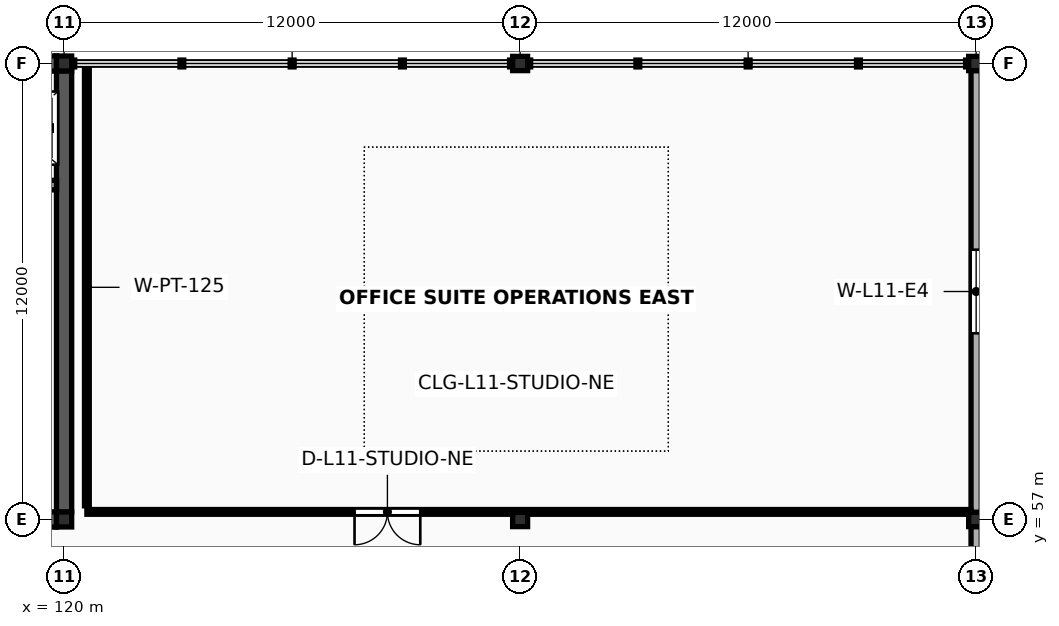
"""IFC4 building model, lengths in metres.
Left out: names, types, materials, properties, quantities, classifications, styles, units other than length and angle.
Written with IfcOpenShell. Run it as: python <this file> out.ifc"""

import sys

from ifc_helpers import new_model, si_unit, direction, frame, frame_2d, origin, origin_2d, place, context, subcontext, project, spatial, rectangle, i_section, extrude, element, fill, save


model = new_model("IFC4")
c1 = context("Model", 3, precision=1e-05, world=origin(), true_north=direction((0.0, 1.0)))
c2 = subcontext(c1, "Body", "Model", "MODEL_VIEW")
j1 = project(units=[si_unit("LENGTHUNIT", "METRE"), si_unit("PLANEANGLEUNIT", "RADIAN")], contexts=[c1])
p1 = place(None, origin())
s1 = spatial("IfcSite", under=j1, at=p1, CompositionType="ELEMENT")
p2 = place(p1, origin())
s2 = spatial("IfcBuilding", under=s1, at=p2, CompositionType="ELEMENT")
p3 = place(p2, frame((0.0, 0.0, 45.6)))
s3 = spatial("IfcBuildingStorey", under=s2, at=p3, CompositionType="ELEMENT", Elevation=45.6)
for number, where, z_axis, x_axis in (
    (1, (120.0, 57.0, 0.0), (0.0, 0.0, 1.0), (1.0, 0.0, 0.0)),
    (2, (120.0, 69.0, 0.0), (0.0, 0.0, 1.0), (1.0, 0.0, 0.0)),
):
    element("IfcColumn", number, at=place(p3, frame(where, z_axis=z_axis, x_axis=x_axis)), inside=s3, PredefinedType="COLUMN", context=c2, shape_type="SweptSolid", body=[
        extrude(i_section(OverallWidth=0.399, OverallDepth=0.393, WebThickness=0.023, FlangeThickness=0.037, FilletRadius=0.018, at=origin_2d()), origin(), (0.0, 0.0, 1.0), 4.0),
    ])
for number, where, z_axis, x_axis in (
    (3, (132.0, 57.0, 0.0), (0.0, 0.0, 1.0), (1.0, 0.0, 0.0)),
    (4, (132.0, 69.0, 0.0), (0.0, 0.0, 1.0), (1.0, 0.0, 0.0)),
    (5, (144.0, 57.0, 0.0), (0.0, 0.0, 1.0), (1.0, 0.0, 0.0)),
    (6, (144.0, 69.0, 0.0), (0.0, 0.0, 1.0), (1.0, 0.0, 0.0)),
):
    element("IfcColumn", number, at=place(p3, frame(where, z_axis=z_axis, x_axis=x_axis)), inside=s3, PredefinedType="COLUMN", context=c2, shape_type="SweptSolid", body=[
        extrude(i_section(OverallWidth=0.394, OverallDepth=0.375, WebThickness=0.017, FlangeThickness=0.028, FilletRadius=0.018, at=origin_2d()), origin(), (0.0, 0.0, 1.0), 4.0),
    ])
p4 = place(p3, frame((108.197, 57.0, 0.0), z_axis=(0.0, 0.0, 1.0), x_axis=(1.0, 0.0, 0.0)))
e7 = element("IfcWall", 7, at=p4, inside=s3, PredefinedType="SHEAR", context=c2, shape_type="SweptSolid", body=[
    extrude(rectangle(XDim=11.607, YDim=0.4, at=frame_2d((5.803, 0.0))), origin(), (0.0, 0.0, 1.0), 3.843),
])
p5 = place(p4, frame((5.004, 0.0, 0.0)))
e8 = element("IfcOpeningElement", 8, at=p5, cuts=e7, PredefinedType="OPENING", context=c2, shape_type="SweptSolid", body=[
    extrude(rectangle(XDim=1.2, YDim=2.2, at=frame_2d((0.6, 1.1))), frame((0.0, 0.215, 0.0), z_axis=(0.0, -1.0, 0.0), x_axis=(1.0, 0.0, 0.0)), (0.0, 0.0, 1.0), 0.43),
])
p6 = place(p4, frame((8.704, 0.0, 0.0)))
e9 = element("IfcOpeningElement", 9, at=p6, cuts=e7, PredefinedType="OPENING", context=c2, shape_type="SweptSolid", body=[
    extrude(rectangle(XDim=1.5, YDim=2.25, at=frame_2d((0.75, 1.125))), frame((0.0, 0.215, 0.0), z_axis=(0.0, -1.0, 0.0), x_axis=(1.0, 0.0, 0.0)), (0.0, 0.0, 1.0), 0.43),
])
p7 = place(p3, frame((108.197, 69.0, 0.0), z_axis=(0.0, 0.0, 1.0), x_axis=(1.0, 0.0, 0.0)))
e10 = element("IfcWall", 10, at=p7, inside=s3, PredefinedType="SHEAR", context=c2, shape_type="SweptSolid", body=[
    extrude(rectangle(XDim=11.607, YDim=0.4, at=frame_2d((5.803, 0.0))), origin(), (0.0, 0.0, 1.0), 3.843),
])
p8 = place(p3, frame((120.0, 57.194, 0.0), z_axis=(0.0, 0.0, 1.0), x_axis=(0.0, 1.0, 0.0)))
e11 = element("IfcWall", 11, at=p8, inside=s3, PredefinedType="SHEAR", context=c2, shape_type="SweptSolid", body=[
    extrude(rectangle(XDim=11.613, YDim=0.4, at=frame_2d((5.806, 0.0))), origin(), (0.0, 0.0, 1.0), 3.843),
])
p9 = place(p3, frame((112.597, 65.8, 0.0), z_axis=(0.0, 0.0, 1.0), x_axis=(1.0, 0.0, 0.0)))
e12 = element("IfcWall", 12, at=p9, inside=s3, PredefinedType="SOLIDWALL", context=c2, shape_type="SweptSolid", body=[
    extrude(rectangle(XDim=7.206, YDim=0.25, at=frame_2d((3.603, 0.0))), origin(), (0.0, 0.0, 1.0), 3.843),
])
p10 = place(p9, frame((0.653, 0.0, 0.0)))
e13 = element("IfcOpeningElement", 13, at=p10, cuts=e12, PredefinedType="OPENING", context=c2, shape_type="SweptSolid", body=[
    extrude(rectangle(XDim=1.1, YDim=2.24, at=frame_2d((0.55, 1.12))), frame((0.0, 0.14, 0.0), z_axis=(0.0, -1.0, 0.0), x_axis=(1.0, 0.0, 0.0)), (0.0, 0.0, 1.0), 0.28),
])
p11 = place(p9, frame((3.153, 0.0, 0.0)))
e14 = element("IfcOpeningElement", 14, at=p11, cuts=e12, PredefinedType="OPENING", context=c2, shape_type="SweptSolid", body=[
    extrude(rectangle(XDim=1.05, YDim=2.2, at=frame_2d((0.525, 1.1))), frame((0.0, 0.14, 0.0), z_axis=(0.0, -1.0, 0.0), x_axis=(1.0, 0.0, 0.0)), (0.0, 0.0, 1.0), 0.28),
])
p12 = place(p9, frame((5.528, 0.0, 0.0)))
e15 = element("IfcOpeningElement", 15, at=p12, cuts=e12, PredefinedType="OPENING", context=c2, shape_type="SweptSolid", body=[
    extrude(rectangle(XDim=1.05, YDim=2.2, at=frame_2d((0.525, 1.1))), frame((0.0, 0.14, 0.0), z_axis=(0.0, -1.0, 0.0), x_axis=(1.0, 0.0, 0.0)), (0.0, 0.0, 1.0), 0.28),
])
p13 = place(p3, frame((144.0, 45.186, 0.0), z_axis=(0.0, 0.0, 1.0), x_axis=(0.0, 1.0, 0.0)))
e16 = element("IfcWall", 16, at=p13, inside=s3, PredefinedType="SOLIDWALL", context=c2, shape_type="SweptSolid", body=[
    extrude(rectangle(XDim=11.629, YDim=0.27, at=frame_2d((5.814, 0.0))), origin(), (0.0, 0.0, 1.0), 3.236),
])
p14 = place(p13, frame((4.79, 0.0, 0.78)))
e17 = element("IfcOpeningElement", 17, at=p14, cuts=e16, PredefinedType="OPENING", context=c2, shape_type="SweptSolid", body=[
    extrude(rectangle(XDim=2.05, YDim=1.25, at=frame_2d((1.025, 0.625))), frame((0.0, 0.15, 0.0), z_axis=(0.0, -1.0, 0.0), x_axis=(1.0, 0.0, 0.0)), (0.0, 0.0, 1.0), 0.3),
])
p15 = place(p3, frame((144.0, 57.186, 0.0), z_axis=(0.0, 0.0, 1.0), x_axis=(0.0, 1.0, 0.0)))
e18 = element("IfcWall", 18, at=p15, inside=s3, PredefinedType="SOLIDWALL", context=c2, shape_type="SweptSolid", body=[
    extrude(rectangle(XDim=11.629, YDim=0.27, at=frame_2d((5.814, 0.0))), origin(), (0.0, 0.0, 1.0), 3.236),
])
p16 = place(p15, frame((4.714, 0.0, 0.78)))
e19 = element("IfcOpeningElement", 19, at=p16, cuts=e18, PredefinedType="OPENING", context=c2, shape_type="SweptSolid", body=[
    extrude(rectangle(XDim=2.2, YDim=1.25, at=frame_2d((1.1, 0.625))), frame((0.0, 0.15, 0.0), z_axis=(0.0, -1.0, 0.0), x_axis=(1.0, 0.0, 0.0)), (0.0, 0.0, 1.0), 0.3),
])
p17 = place(p3, frame((120.6, 57.2, 0.0), z_axis=(0.0, 0.0, 1.0), x_axis=(1.0, 0.0, 0.0)))
e20 = element("IfcWall", 20, at=p17, inside=s3, PredefinedType="PARTITIONING", context=c2, shape_type="SweptSolid", body=[
    extrude(rectangle(XDim=23.26, YDim=0.125, at=frame_2d((11.63, 0.0))), origin(), (0.0, 0.0, 1.0), 2.88),
])
p18 = place(p17, frame((7.043, 0.0, 0.0)))
e21 = element("IfcOpeningElement", 21, at=p18, cuts=e20, PredefinedType="OPENING", context=c2, shape_type="SweptSolid", body=[
    extrude(rectangle(XDim=1.73, YDim=2.37, at=frame_2d((0.865, 1.185))), frame((0.0, 0.077, 0.0), z_axis=(0.0, -1.0, 0.0), x_axis=(1.0, 0.0, 0.0)), (0.0, 0.0, 1.0), 0.155),
])
p19 = place(p3, frame((120.6, 57.36, 0.0), z_axis=(0.0, 0.0, 1.0), x_axis=(0.0, 1.0, 0.0)))
e22 = element("IfcWall", 22, at=p19, inside=s3, PredefinedType="PARTITIONING", context=c2, shape_type="SweptSolid", body=[
    extrude(rectangle(XDim=11.5, YDim=0.125, at=frame_2d((5.75, 0.0))), origin(), (0.0, 0.0, 1.0), 2.88),
])
p20 = place(p16, origin())
e23 = element("IfcWindow", 23, at=p20, inside=s3, PartitioningType="DOUBLE_PANEL_VERTICAL", PredefinedType="WINDOW", context=c2, shape_type="SweptSolid", body=[
    extrude(rectangle(XDim=2.2, YDim=1.25, at=frame_2d((1.1, 0.625))), frame((0.0, 0.03, 0.0), z_axis=(0.0, -1.0, 0.0), x_axis=(1.0, 0.0, 0.0)), (0.0, 0.0, 1.0), 0.06),
])
fill(e19, e23)
p21 = place(p18, origin())
e24 = element("IfcDoor", 24, at=p21, inside=s3, OperationType="DOUBLE_DOOR_SINGLE_SWING", PredefinedType="DOOR", context=c2, shape_type="SweptSolid", body=[
    extrude(rectangle(XDim=1.73, YDim=2.37, at=frame_2d((0.865, 1.185))), frame((0.0, 0.025, 0.0), z_axis=(0.0, -1.0, 0.0), x_axis=(1.0, 0.0, 0.0)), (0.0, 0.0, 1.0), 0.05),
])
fill(e21, e24)
save(model, sys.argv[1])
